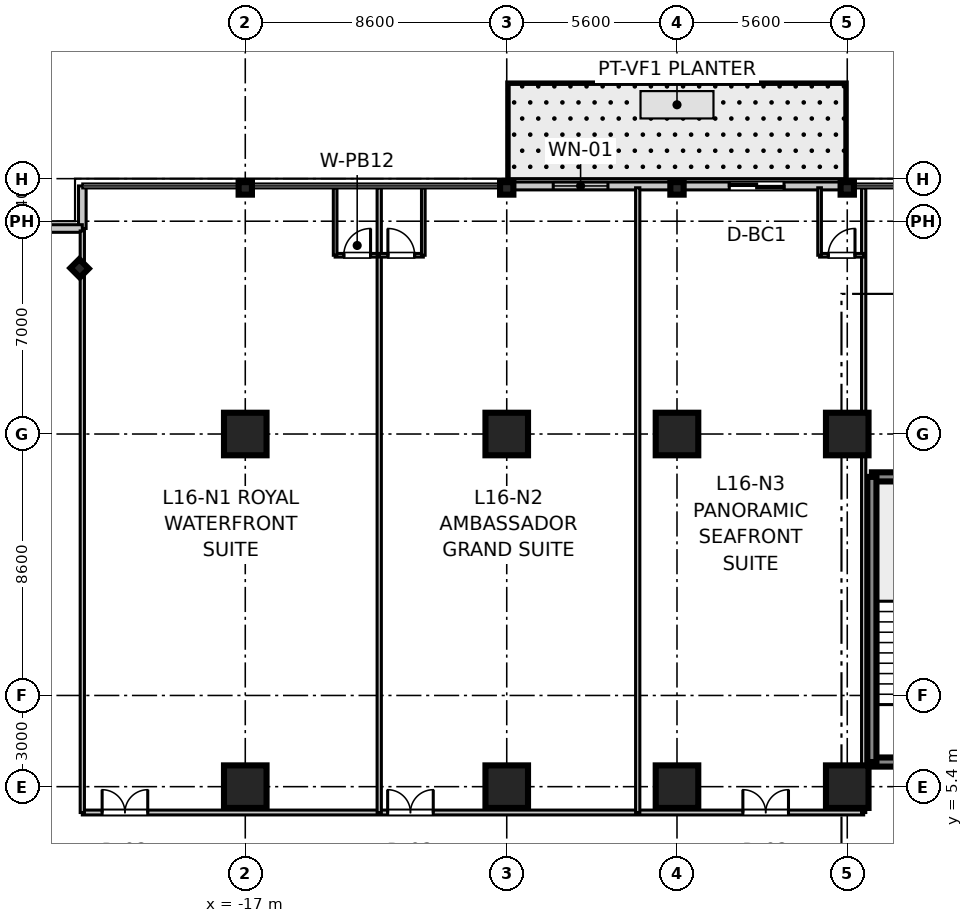
"""IFC4 building model, lengths in metres.
Left out: names, types, materials, properties, quantities, classifications, styles, units other than length and angle.
Written with IfcOpenShell. Run it as: python <this file> out.ifc"""

import sys

from ifc_helpers import new_model, si_unit, direction, frame, frame_2d, origin, origin_2d, place, context, subcontext, project, spatial, rectangle, i_section, extrude, source, transform, mapped, element, fill, save


model = new_model("IFC4")
c1 = context("Model", 3, precision=1e-05, world=origin(), true_north=direction((0.0, 1.0)))
c2 = subcontext(c1, "Body", "Model", "MODEL_VIEW")
j1 = project(units=[si_unit("LENGTHUNIT", "METRE"), si_unit("PLANEANGLEUNIT", "RADIAN")], contexts=[c1])
p1 = place(None, origin())
s1 = spatial("IfcSite", under=j1, at=p1, CompositionType="ELEMENT")
p2 = place(p1, origin())
s2 = spatial("IfcBuilding", under=s1, at=p2, CompositionType="ELEMENT")
p3 = place(p2, frame((0.0, 0.0, 68.9)))
s3 = spatial("IfcBuildingStorey", under=s2, at=p3, CompositionType="ELEMENT", Elevation=68.9)
m1 = source(origin(), c2, "Body", "SweptSolid", [
    extrude(rectangle(XDim=1.4, YDim=1.4, at=origin_2d()), origin(), (0.0, 0.0, 1.0), 3.605),
])
for number, where, z_axis, x_axis in (
    (1, (-17.0, 5.4, 0.0), (0.0, 0.0, 1.0), (1.0, 0.0, 0.0)),
    (2, (-17.0, 17.0, 0.0), (0.0, 0.0, 1.0), (1.0, 0.0, 0.0)),
    (3, (-8.4, 5.4, 0.0), (0.0, 0.0, 1.0), (1.0, 0.0, 0.0)),
    (4, (-8.4, 17.0, 0.0), (0.0, 0.0, 1.0), (1.0, 0.0, 0.0)),
    (5, (-2.8, 5.4, 0.0), (0.0, 0.0, 1.0), (1.0, 0.0, 0.0)),
    (6, (-2.8, 17.0, 0.0), (0.0, 0.0, 1.0), (1.0, 0.0, 0.0)),
    (7, (2.8, 5.4, 0.0), (0.0, 0.0, 1.0), (1.0, 0.0, 0.0)),
    (8, (2.8, 17.0, 0.0), (0.0, 0.0, 1.0), (1.0, 0.0, 0.0)),
):
    element("IfcColumn", number, at=place(p3, frame(where, z_axis=z_axis, x_axis=x_axis)), inside=s3, PredefinedType="COLUMN", context=c2, shape_type="MappedRepresentation", body=[
        mapped(m1, transform((0.0, 0.0, 0.0), scale=1.0)),
    ])
m2 = source(origin(), c2, "Body", "SweptSolid", [
    extrude(i_section(OverallWidth=0.412, OverallDepth=0.438, WebThickness=0.023, FlangeThickness=0.036, at=origin_2d()), origin(), (0.0, 0.0, 1.0), 3.605),
])
for number, where, z_axis, x_axis in (
    (9, (-17.0, 25.08, 0.0), (0.0, 0.0, 1.0), (0.0, 1.0, 0.0)),
    (10, (-8.4, 25.08, 0.0), (0.0, 0.0, 1.0), (0.0, 1.0, 0.0)),
    (11, (-2.8, 25.08, 0.0), (0.0, 0.0, 1.0), (0.0, 1.0, 0.0)),
    (12, (2.8, 25.08, 0.0), (0.0, 0.0, 1.0), (0.0, 1.0, 0.0)),
    (13, (-22.45, 22.45, 0.0), (0.0, 0.0, 1.0), (0.707, 0.707, 0.0)),
):
    element("IfcColumn", number, at=place(p3, frame(where, z_axis=z_axis, x_axis=x_axis)), inside=s3, PredefinedType="COLUMN", context=c2, shape_type="MappedRepresentation", body=[
        mapped(m2, transform((0.0, 0.0, 0.0), scale=1.0)),
    ])
m3 = source(origin(), c2, "Body", "SweptSolid", [
    extrude(rectangle(XDim=3.98, YDim=0.3, at=frame_2d((1.99, 0.0))), origin(), (0.0, 0.0, 1.0), 3.37),
])
for number, where, z_axis, x_axis in (
    (14, (3.61, 6.21, 0.0), (0.0, 0.0, 1.0), (1.0, 0.0, 0.0)),
    (15, (3.61, 15.59, 0.0), (0.0, 0.0, 1.0), (1.0, 0.0, 0.0)),
):
    element("IfcWall", number, at=place(p3, frame(where, z_axis=z_axis, x_axis=x_axis)), inside=s3, PredefinedType="SHEAR", context=c2, shape_type="MappedRepresentation", body=[
        mapped(m3, transform((0.0, 0.0, 0.0), scale=1.0)),
    ])
m4 = source(origin(), c2, "Body", "SweptSolid", [
    extrude(rectangle(XDim=9.38, YDim=0.3, at=frame_2d((4.69, 0.0))), origin(), (0.0, 0.0, 1.0), 3.37),
])
p4 = place(p3, frame((3.61, 6.21, 0.0), z_axis=(0.0, 0.0, 1.0), x_axis=(0.0, 1.0, 0.0)))
e16 = element("IfcWall", 16, at=p4, inside=s3, PredefinedType="SHEAR", context=c2, shape_type="MappedRepresentation", body=[
    mapped(m4, transform((0.0, 0.0, 0.0), scale=1.0)),
])
m5 = source(origin(), c2, "Body", "SweptSolid", [
    extrude(rectangle(XDim=1.4, YDim=0.25, at=frame_2d((0.7, 0.0))), origin(), (0.0, 0.0, 1.0), 3.37),
])
for number, where, z_axis, x_axis in (
    (17, (-22.36, 23.76, 0.0), (0.0, 0.0, 1.0), (0.0, 1.0, 0.0)),
    (18, (-23.76, 23.76, 0.0), (0.0, 0.0, 1.0), (1.0, 0.0, 0.0)),
):
    element("IfcWall", number, at=place(p3, frame(where, z_axis=z_axis, x_axis=x_axis)), inside=s3, PredefinedType="STANDARD", context=c2, shape_type="MappedRepresentation", body=[
        mapped(m5, transform((0.0, 0.0, 0.0), scale=1.0)),
    ])
m6 = source(origin(), c2, "Body", "SweptSolid", [
    extrude(rectangle(XDim=11.2, YDim=0.26, at=frame_2d((5.6, 0.0))), origin(), (0.0, 0.0, 1.0), 2.85),
])
p5 = place(p3, frame((-8.4, 25.16, 0.0), z_axis=(0.0, 0.0, 1.0), x_axis=(1.0, 0.0, 0.0)))
e19 = element("IfcWall", 19, at=p5, inside=s3, PredefinedType="STANDARD", context=c2, shape_type="MappedRepresentation", body=[
    mapped(m6, transform((0.0, 0.0, 0.0), scale=1.0)),
])
p6 = place(p5, frame((7.32, 0.0, 0.0)))
e20 = element("IfcOpeningElement", 20, at=p6, cuts=e19, PredefinedType="OPENING", context=c2, shape_type="SweptSolid", body=[
    extrude(rectangle(XDim=1.8, YDim=2.25, at=frame_2d((0.9, 1.125))), frame((0.0, 0.14, 0.0), z_axis=(0.0, -1.0, 0.0), x_axis=(1.0, 0.0, 0.0)), (0.0, 0.0, 1.0), 0.28),
])
p7 = place(p5, frame((1.529, 0.0, 0.85)))
e21 = element("IfcOpeningElement", 21, at=p7, cuts=e19, PredefinedType="OPENING", context=c2, shape_type="SweptSolid", body=[
    extrude(rectangle(XDim=1.8, YDim=1.5, at=frame_2d((0.9, 0.75))), frame((0.0, 0.14, 0.0), z_axis=(0.0, -1.0, 0.0), x_axis=(1.0, 0.0, 0.0)), (0.0, 0.0, 1.0), 0.28),
])
m7 = source(origin(), c2, "Body", "SweptSolid", [
    extrude(rectangle(XDim=25.7, YDim=0.16, at=frame_2d((12.85, 0.0))), origin(), (0.0, 0.0, 1.0), 2.71),
])
p8 = place(p3, frame((-22.36, 4.55, 0.0), z_axis=(0.0, 0.0, 1.0), x_axis=(1.0, 0.0, 0.0)))
e22 = element("IfcWall", 22, at=p8, inside=s3, PredefinedType="PARTITIONING", context=c2, shape_type="MappedRepresentation", body=[
    mapped(m7, transform((0.0, 0.0, 0.0), scale=1.0)),
])
p9 = place(p8, frame((0.652, 0.0, 0.0)))
e23 = element("IfcOpeningElement", 23, at=p9, cuts=e22, PredefinedType="OPENING", context=c2, shape_type="SweptSolid", body=[
    extrude(rectangle(XDim=1.5, YDim=2.15, at=frame_2d((0.75, 1.075))), frame((0.0, 0.09, 0.0), z_axis=(0.0, -1.0, 0.0), x_axis=(1.0, 0.0, 0.0)), (0.0, 0.0, 1.0), 0.18),
])
p10 = place(p8, frame((10.043, 0.0, 0.0)))
e24 = element("IfcOpeningElement", 24, at=p10, cuts=e22, PredefinedType="OPENING", context=c2, shape_type="SweptSolid", body=[
    extrude(rectangle(XDim=1.5, YDim=2.15, at=frame_2d((0.75, 1.075))), frame((0.0, 0.09, 0.0), z_axis=(0.0, -1.0, 0.0), x_axis=(1.0, 0.0, 0.0)), (0.0, 0.0, 1.0), 0.18),
])
p11 = place(p8, frame((21.727, 0.0, 0.0)))
e25 = element("IfcOpeningElement", 25, at=p11, cuts=e22, PredefinedType="OPENING", context=c2, shape_type="SweptSolid", body=[
    extrude(rectangle(XDim=1.5, YDim=2.15, at=frame_2d((0.75, 1.075))), frame((0.0, 0.09, 0.0), z_axis=(0.0, -1.0, 0.0), x_axis=(1.0, 0.0, 0.0)), (0.0, 0.0, 1.0), 0.18),
])
m8 = source(origin(), c2, "Body", "SweptSolid", [
    extrude(rectangle(XDim=19.13, YDim=0.14, at=frame_2d((9.565, 0.0))), origin(), (0.0, 0.0, 1.0), 2.71),
])
p12 = place(p3, frame((-22.36, 4.55, 0.0), z_axis=(0.0, 0.0, 1.0), x_axis=(0.0, 1.0, 0.0)))
e26 = element("IfcWall", 26, at=p12, inside=s3, PredefinedType="PARTITIONING", context=c2, shape_type="MappedRepresentation", body=[
    mapped(m8, transform((0.0, 0.0, 0.0), scale=1.0)),
])
m9 = source(origin(), c2, "Body", "SweptSolid", [
    extrude(rectangle(XDim=20.55, YDim=0.14, at=frame_2d((10.275, 0.0))), origin(), (0.0, 0.0, 1.0), 2.71),
])
p13 = place(p3, frame((3.34, 4.55, 0.0), z_axis=(0.0, 0.0, 1.0), x_axis=(0.0, 1.0, 0.0)))
e27 = element("IfcWall", 27, at=p13, inside=s3, PredefinedType="PARTITIONING", context=c2, shape_type="MappedRepresentation", body=[
    mapped(m9, transform((0.0, 0.0, 0.0), scale=1.0)),
])
m10 = source(origin(), c2, "Body", "SweptSolid", [
    extrude(rectangle(XDim=1.45, YDim=0.12, at=frame_2d((0.725, 0.0))), origin(), (0.0, 0.0, 1.0), 2.71),
])
p14 = place(p3, frame((-14.044, 22.88, 0.0), z_axis=(0.0, 0.0, 1.0), x_axis=(1.0, 0.0, 0.0)))
e28 = element("IfcWall", 28, at=p14, inside=s3, PredefinedType="PARTITIONING", context=c2, shape_type="MappedRepresentation", body=[
    mapped(m10, transform((0.0, 0.0, 0.0), scale=1.0)),
])
p15 = place(p14, frame((0.285, 0.0, 0.0)))
e29 = element("IfcOpeningElement", 29, at=p15, cuts=e28, PredefinedType="OPENING", context=c2, shape_type="SweptSolid", body=[
    extrude(rectangle(XDim=0.88, YDim=2.1, at=frame_2d((0.44, 1.05))), frame((0.0, 0.07, 0.0), z_axis=(0.0, -1.0, 0.0), x_axis=(1.0, 0.0, 0.0)), (0.0, 0.0, 1.0), 0.14),
])
m11 = source(origin(), c2, "Body", "SweptSolid", [
    extrude(rectangle(XDim=2.22, YDim=0.12, at=frame_2d((1.11, 0.0))), origin(), (0.0, 0.0, 1.0), 2.71),
])
p16 = place(p3, frame((-14.044, 22.88, 0.0), z_axis=(0.0, 0.0, 1.0), x_axis=(0.0, 1.0, 0.0)))
e30 = element("IfcWall", 30, at=p16, inside=s3, PredefinedType="PARTITIONING", context=c2, shape_type="MappedRepresentation", body=[
    mapped(m11, transform((0.0, 0.0, 0.0), scale=1.0)),
])
p17 = place(p3, frame((-12.594, 4.55, 0.0), z_axis=(0.0, 0.0, 1.0), x_axis=(0.0, 1.0, 0.0)))
e31 = element("IfcWall", 31, at=p17, inside=s3, PredefinedType="PARTITIONING", context=c2, shape_type="MappedRepresentation", body=[
    mapped(m9, transform((0.0, 0.0, 0.0), scale=1.0)),
])
p18 = place(p3, frame((-12.594, 22.88, 0.0), z_axis=(0.0, 0.0, 1.0), x_axis=(1.0, 0.0, 0.0)))
e32 = element("IfcWall", 32, at=p18, inside=s3, PredefinedType="PARTITIONING", context=c2, shape_type="MappedRepresentation", body=[
    mapped(m10, transform((0.0, 0.0, 0.0), scale=1.0)),
])
p19 = place(p18, frame((0.285, 0.0, 0.0)))
e33 = element("IfcOpeningElement", 33, at=p19, cuts=e32, PredefinedType="OPENING", context=c2, shape_type="SweptSolid", body=[
    extrude(rectangle(XDim=0.88, YDim=2.1, at=frame_2d((0.44, 1.05))), frame((0.0, 0.07, 0.0), z_axis=(0.0, -1.0, 0.0), x_axis=(1.0, 0.0, 0.0)), (0.0, 0.0, 1.0), 0.14),
])
p20 = place(p3, frame((-11.144, 22.88, 0.0), z_axis=(0.0, 0.0, 1.0), x_axis=(0.0, 1.0, 0.0)))
e34 = element("IfcWall", 34, at=p20, inside=s3, PredefinedType="PARTITIONING", context=c2, shape_type="MappedRepresentation", body=[
    mapped(m11, transform((0.0, 0.0, 0.0), scale=1.0)),
])
p21 = place(p3, frame((-4.092, 4.55, 0.0), z_axis=(0.0, 0.0, 1.0), x_axis=(0.0, 1.0, 0.0)))
e35 = element("IfcWall", 35, at=p21, inside=s3, PredefinedType="PARTITIONING", context=c2, shape_type="MappedRepresentation", body=[
    mapped(m9, transform((0.0, 0.0, 0.0), scale=1.0)),
])
m12 = source(origin(), c2, "Body", "SweptSolid", [
    extrude(rectangle(XDim=1.45, YDim=0.12, at=frame_2d((0.725, 0.0))), origin(), (0.0, 0.0, 1.0), 2.71),
])
p22 = place(p3, frame((1.89, 22.88, 0.0), z_axis=(0.0, 0.0, 1.0), x_axis=(1.0, 0.0, 0.0)))
e36 = element("IfcWall", 36, at=p22, inside=s3, PredefinedType="PARTITIONING", context=c2, shape_type="MappedRepresentation", body=[
    mapped(m12, transform((0.0, 0.0, 0.0), scale=1.0)),
])
p23 = place(p22, frame((0.285, 0.0, 0.0)))
e37 = element("IfcOpeningElement", 37, at=p23, cuts=e36, PredefinedType="OPENING", context=c2, shape_type="SweptSolid", body=[
    extrude(rectangle(XDim=0.88, YDim=2.1, at=frame_2d((0.44, 1.05))), frame((0.0, 0.07, 0.0), z_axis=(0.0, -1.0, 0.0), x_axis=(1.0, 0.0, 0.0)), (0.0, 0.0, 1.0), 0.14),
])
p24 = place(p3, frame((1.89, 22.88, 0.0), z_axis=(0.0, 0.0, 1.0), x_axis=(0.0, 1.0, 0.0)))
e38 = element("IfcWall", 38, at=p24, inside=s3, PredefinedType="PARTITIONING", context=c2, shape_type="MappedRepresentation", body=[
    mapped(m11, transform((0.0, 0.0, 0.0), scale=1.0)),
])
m13 = source(origin(), c2, "Body", "SweptSolid", [
    extrude(rectangle(XDim=0.88, YDim=2.1, at=frame_2d((0.44, 1.05))), frame((0.0, 0.025, 0.0), z_axis=(0.0, -1.0, 0.0), x_axis=(1.0, 0.0, 0.0)), (0.0, 0.0, 1.0), 0.05),
])
p25 = place(p15, origin())
e39 = element("IfcDoor", 39, at=p25, inside=s3, OperationType="SINGLE_SWING_RIGHT", PredefinedType="DOOR", context=c2, shape_type="MappedRepresentation", body=[
    mapped(m13, transform((0.0, 0.0, 0.0), scale=1.0)),
])
fill(e29, e39)
m14 = source(origin(), c2, "Body", "SweptSolid", [
    extrude(rectangle(XDim=1.5, YDim=2.15, at=frame_2d((0.75, 1.075))), frame((0.0, 0.025, 0.0), z_axis=(0.0, -1.0, 0.0), x_axis=(1.0, 0.0, 0.0)), (0.0, 0.0, 1.0), 0.05),
])
p26 = place(p9, origin())
e40 = element("IfcDoor", 40, at=p26, inside=s3, OperationType="DOUBLE_DOOR_SINGLE_SWING", PredefinedType="DOOR", context=c2, shape_type="MappedRepresentation", body=[
    mapped(m14, transform((0.0, 0.0, 0.0), scale=1.0)),
])
fill(e23, e40)
p27 = place(p19, origin())
e41 = element("IfcDoor", 41, at=p27, inside=s3, OperationType="SINGLE_SWING_LEFT", PredefinedType="DOOR", context=c2, shape_type="MappedRepresentation", body=[
    mapped(m13, transform((0.0, 0.0, 0.0), scale=1.0)),
])
fill(e33, e41)
p28 = place(p10, origin())
e42 = element("IfcDoor", 42, at=p28, inside=s3, OperationType="DOUBLE_DOOR_SINGLE_SWING", PredefinedType="DOOR", context=c2, shape_type="MappedRepresentation", body=[
    mapped(m14, transform((0.0, 0.0, 0.0), scale=1.0)),
])
fill(e24, e42)
p29 = place(p23, origin())
e43 = element("IfcDoor", 43, at=p29, inside=s3, OperationType="SINGLE_SWING_RIGHT", PredefinedType="DOOR", context=c2, shape_type="MappedRepresentation", body=[
    mapped(m13, transform((0.0, 0.0, 0.0), scale=1.0)),
])
fill(e37, e43)
p30 = place(p11, origin())
e44 = element("IfcDoor", 44, at=p30, inside=s3, OperationType="DOUBLE_DOOR_SINGLE_SWING", PredefinedType="DOOR", context=c2, shape_type="MappedRepresentation", body=[
    mapped(m14, transform((0.0, 0.0, 0.0), scale=1.0)),
])
fill(e25, e44)
m15 = source(origin(), c2, "Body", "SweptSolid", [
    extrude(rectangle(XDim=1.8, YDim=2.25, at=frame_2d((0.9, 1.125))), frame((0.0, 0.025, 0.0), z_axis=(0.0, -1.0, 0.0), x_axis=(1.0, 0.0, 0.0)), (0.0, 0.0, 1.0), 0.05),
])
p31 = place(p6, origin())
e45 = element("IfcDoor", 45, at=p31, inside=s3, OperationType="DOUBLE_DOOR_SLIDING", PredefinedType="DOOR", context=c2, shape_type="MappedRepresentation", body=[
    mapped(m15, transform((0.0, 0.0, 0.0), scale=1.0)),
])
fill(e20, e45)
m16 = source(origin(), c2, "Body", "SweptSolid", [
    extrude(rectangle(XDim=1.8, YDim=1.5, at=frame_2d((0.9, 0.75))), frame((0.0, 0.03, 0.0), z_axis=(0.0, -1.0, 0.0), x_axis=(1.0, 0.0, 0.0)), (0.0, 0.0, 1.0), 0.06),
])
p32 = place(p7, origin())
e46 = element("IfcWindow", 46, at=p32, inside=s3, PartitioningType="SINGLE_PANEL", PredefinedType="WINDOW", context=c2, shape_type="MappedRepresentation", body=[
    mapped(m16, transform((0.0, 0.0, 0.0), scale=1.0)),
])
fill(e21, e46)
save(model, sys.argv[1])
